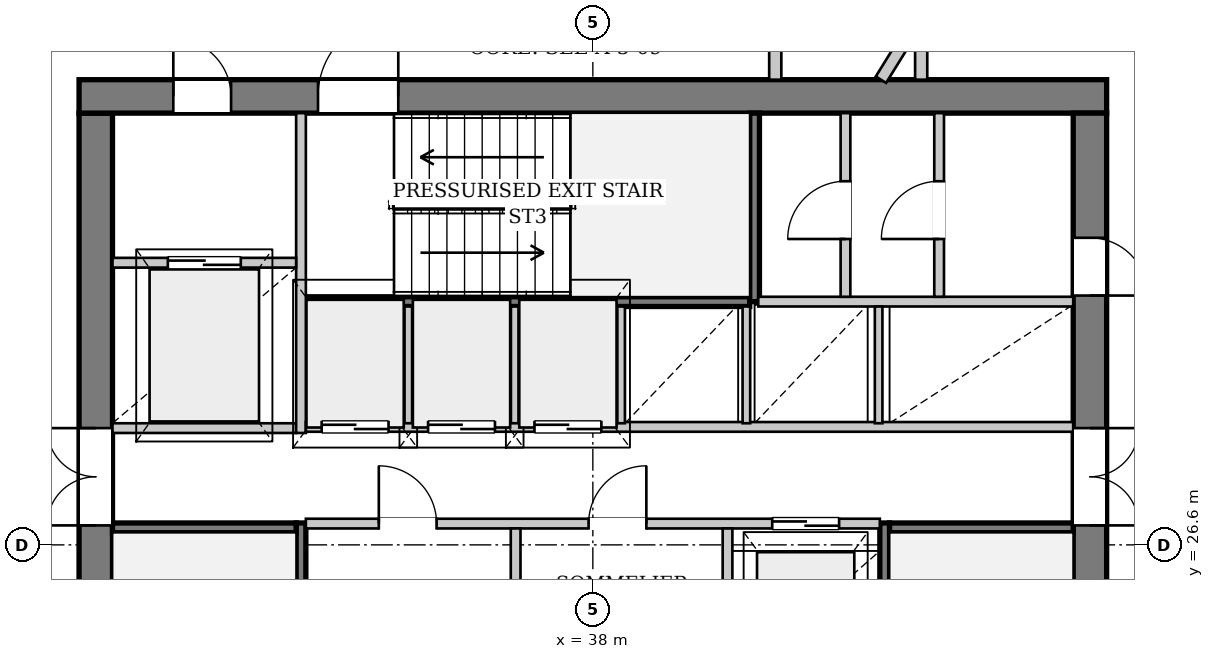
"""IFC4 building model, lengths in metres.
Left out: names, types, materials, properties, quantities, classifications, styles, units other than length and angle.
Written with IfcOpenShell. Run it as: python <this file> out.ifc"""

import sys

from ifc_helpers import new_model, si_unit, direction, frame, frame_2d, origin, place, context, subcontext, project, spatial, rectangle, extrude, source, transform, mapped, element, fill, save


model = new_model("IFC4")
c1 = context("Model", 3, precision=1e-05, world=origin(), true_north=direction((0.0, 1.0)))
c2 = subcontext(c1, "Body", "Model", "MODEL_VIEW")
j1 = project(units=[si_unit("LENGTHUNIT", "METRE"), si_unit("PLANEANGLEUNIT", "RADIAN")], contexts=[c1])
p1 = place(None, origin())
s1 = spatial("IfcSite", under=j1, at=p1, CompositionType="ELEMENT")
p2 = place(p1, origin())
s2 = spatial("IfcBuilding", under=s1, at=p2, CompositionType="ELEMENT")
p3 = place(p2, frame((0.0, 0.0, 178.55)))
s3 = spatial("IfcBuildingStorey", under=s2, at=p3, CompositionType="ELEMENT", Elevation=178.55)
p4 = place(p3, frame((29.825, 19.5, 0.0), z_axis=(0.0, 0.0, 1.0), x_axis=(0.0, 1.0, 0.0)))
e1 = element("IfcWall", 1, at=p4, inside=s3, PredefinedType="SHEAR", context=c2, shape_type="SweptSolid", body=[
    extrude(rectangle(XDim=14.2, YDim=0.55, at=frame_2d((7.1, 0.0))), origin(), (0.0, 0.0, 1.0), 3.33),
])
p5 = place(p4, frame((7.42, 0.0, 0.0)))
e2 = element("IfcOpeningElement", 2, at=p5, cuts=e1, PredefinedType="OPENING", context=c2, shape_type="SweptSolid", body=[
    extrude(rectangle(XDim=1.6, YDim=2.2, at=frame_2d((0.8, 1.1))), frame((0.0, 0.285, 0.0), z_axis=(0.0, -1.0, 0.0), x_axis=(1.0, 0.0, 0.0)), (0.0, 0.0, 1.0), 0.57),
])
p6 = place(p3, frame((29.55, 33.975, 0.0), z_axis=(0.0, 0.0, 1.0), x_axis=(1.0, 0.0, 0.0)))
e3 = element("IfcWall", 3, at=p6, inside=s3, PredefinedType="SHEAR", context=c2, shape_type="SweptSolid", body=[
    extrude(rectangle(XDim=16.9, YDim=0.55, at=frame_2d((8.45, 0.0))), origin(), (0.0, 0.0, 1.0), 3.33),
])
p7 = place(p6, frame((1.55, 0.0, 0.0)))
e4 = element("IfcOpeningElement", 4, at=p7, cuts=e3, PredefinedType="OPENING", context=c2, shape_type="SweptSolid", body=[
    extrude(rectangle(XDim=0.95, YDim=2.1, at=frame_2d((0.475, 1.05))), frame((0.0, 0.285, 0.0), z_axis=(0.0, -1.0, 0.0), x_axis=(1.0, 0.0, 0.0)), (0.0, 0.0, 1.0), 0.57),
])
p8 = place(p6, frame((3.93, 0.0, 0.0)))
e5 = element("IfcOpeningElement", 5, at=p8, cuts=e3, PredefinedType="OPENING", context=c2, shape_type="SweptSolid", body=[
    extrude(rectangle(XDim=1.32, YDim=2.2, at=frame_2d((0.66, 1.1))), frame((0.0, 0.285, 0.0), z_axis=(0.0, -1.0, 0.0), x_axis=(1.0, 0.0, 0.0)), (0.0, 0.0, 1.0), 0.57),
])
p9 = place(p3, frame((46.175, 33.7, 0.0), z_axis=(0.0, 0.0, 1.0), x_axis=(0.0, -1.0, 0.0)))
e6 = element("IfcWall", 6, at=p9, inside=s3, PredefinedType="SHEAR", context=c2, shape_type="SweptSolid", body=[
    extrude(rectangle(XDim=14.2, YDim=0.55, at=frame_2d((7.1, 0.0))), origin(), (0.0, 0.0, 1.0), 3.33),
])
p10 = place(p9, frame((5.18, 0.0, 0.0)))
e7 = element("IfcOpeningElement", 7, at=p10, cuts=e6, PredefinedType="OPENING", context=c2, shape_type="SweptSolid", body=[
    extrude(rectangle(XDim=1.6, YDim=2.2, at=frame_2d((0.8, 1.1))), frame((0.0, 0.285, 0.0), z_axis=(0.0, -1.0, 0.0), x_axis=(1.0, 0.0, 0.0)), (0.0, 0.0, 1.0), 0.57),
])
p11 = place(p9, frame((2.05, 0.0, 0.0)))
e8 = element("IfcOpeningElement", 8, at=p11, cuts=e6, PredefinedType="OPENING", context=c2, shape_type="SweptSolid", body=[
    extrude(rectangle(XDim=0.95, YDim=2.1, at=frame_2d((0.475, 1.05))), frame((0.0, 0.285, 0.0), z_axis=(0.0, -1.0, 0.0), x_axis=(1.0, 0.0, 0.0)), (0.0, 0.0, 1.0), 0.57),
])
p12 = place(p3, frame((33.2, 19.5, 0.0), z_axis=(0.0, 0.0, 1.0), x_axis=(0.0, 1.0, 0.0)))
e9 = element("IfcWall", 9, at=p12, inside=s3, PredefinedType="PARTITIONING", context=c2, shape_type="SweptSolid", body=[
    extrude(rectangle(XDim=7.46, YDim=0.16, at=frame_2d((3.73, 0.0))), origin(), (0.0, 0.0, 1.0), 3.33),
])
p13 = place(p12, frame((0.08, 0.0, 0.0)))
e10 = element("IfcOpeningElement", 10, at=p13, cuts=e9, PredefinedType="OPENING", context=c2, shape_type="SweptSolid", body=[
    extrude(rectangle(XDim=1.32, YDim=2.2, at=frame_2d((0.66, 1.1))), frame((0.0, 0.09, 0.0), z_axis=(0.0, -1.0, 0.0), x_axis=(1.0, 0.0, 0.0)), (0.0, 0.0, 1.0), 0.18),
])
p14 = place(p3, frame((30.1, 26.88, 0.0), z_axis=(0.0, 0.0, 1.0), x_axis=(1.0, 0.0, 0.0)))
e11 = element("IfcWall", 11, at=p14, inside=s3, PredefinedType="PARTITIONING", context=c2, shape_type="SweptSolid", body=[
    extrude(rectangle(XDim=3.02, YDim=0.16, at=frame_2d((1.51, 0.0))), origin(), (0.0, 0.0, 1.0), 3.33),
])
p15 = place(p3, frame((42.8, 26.96, 0.0), z_axis=(0.0, 0.0, 1.0), x_axis=(0.0, -1.0, 0.0)))
e12 = element("IfcWall", 12, at=p15, inside=s3, PredefinedType="PARTITIONING", context=c2, shape_type="SweptSolid", body=[
    extrude(rectangle(XDim=7.46, YDim=0.16, at=frame_2d((3.73, 0.0))), origin(), (0.0, 0.0, 1.0), 3.33),
])
p16 = place(p15, frame((6.06, 0.0, 0.0)))
e13 = element("IfcOpeningElement", 13, at=p16, cuts=e12, PredefinedType="OPENING", context=c2, shape_type="SweptSolid", body=[
    extrude(rectangle(XDim=1.32, YDim=2.2, at=frame_2d((0.66, 1.1))), frame((0.0, 0.09, 0.0), z_axis=(0.0, -1.0, 0.0), x_axis=(1.0, 0.0, 0.0)), (0.0, 0.0, 1.0), 0.18),
])
p17 = place(p3, frame((42.88, 26.88, 0.0), z_axis=(0.0, 0.0, 1.0), x_axis=(1.0, 0.0, 0.0)))
e14 = element("IfcWall", 14, at=p17, inside=s3, PredefinedType="PARTITIONING", context=c2, shape_type="SweptSolid", body=[
    extrude(rectangle(XDim=3.02, YDim=0.16, at=frame_2d((1.51, 0.0))), origin(), (0.0, 0.0, 1.0), 3.33),
])
p18 = place(p3, frame((33.28, 30.6, 0.0), z_axis=(0.0, 0.0, 1.0), x_axis=(1.0, 0.0, 0.0)))
e15 = element("IfcWall", 15, at=p18, inside=s3, PredefinedType="PARTITIONING", context=c2, shape_type="SweptSolid", body=[
    extrude(rectangle(XDim=7.3, YDim=0.16, at=frame_2d((3.65, 0.0))), origin(), (0.0, 0.0, 1.0), 3.33),
])
p19 = place(p3, frame((40.66, 30.6, 0.0), z_axis=(0.0, 0.0, 1.0), x_axis=(0.0, 1.0, 0.0)))
e16 = element("IfcWall", 16, at=p19, inside=s3, PredefinedType="PARTITIONING", context=c2, shape_type="SweptSolid", body=[
    extrude(rectangle(XDim=3.1, YDim=0.16, at=frame_2d((1.55, 0.0))), origin(), (0.0, 0.0, 1.0), 3.33),
])
p20 = place(p3, frame((30.1, 28.52, 0.0), z_axis=(0.0, 0.0, 1.0), x_axis=(1.0, 0.0, 0.0)))
e17 = element("IfcWall", 17, at=p20, inside=s3, PredefinedType="PARTITIONING", context=c2, shape_type="SweptSolid", body=[
    extrude(rectangle(XDim=3.02, YDim=0.16, at=frame_2d((1.51, 0.0))), origin(), (0.0, 0.0, 1.0), 3.33),
])
p21 = place(p3, frame((33.2, 28.44, 0.0), z_axis=(0.0, 0.0, 1.0), x_axis=(0.0, 1.0, 0.0)))
e18 = element("IfcWall", 18, at=p21, inside=s3, PredefinedType="PARTITIONING", context=c2, shape_type="SweptSolid", body=[
    extrude(rectangle(XDim=5.26, YDim=0.16, at=frame_2d((2.63, 0.0))), origin(), (0.0, 0.0, 1.0), 3.33),
])
p22 = place(p3, frame((30.1, 31.24, 0.0), z_axis=(0.0, 0.0, 1.0), x_axis=(1.0, 0.0, 0.0)))
e19 = element("IfcWall", 19, at=p22, inside=s3, PredefinedType="PARTITIONING", context=c2, shape_type="SweptSolid", body=[
    extrude(rectangle(XDim=3.02, YDim=0.16, at=frame_2d((1.51, 0.0))), origin(), (0.0, 0.0, 1.0), 3.33),
])
p23 = place(p22, frame((0.91, 0.0, 0.0)))
e20 = element("IfcOpeningElement", 20, at=p23, cuts=e19, PredefinedType="OPENING", context=c2, shape_type="SweptSolid", body=[
    extrude(rectangle(XDim=1.2, YDim=2.2, at=frame_2d((0.6, 1.1))), frame((0.0, 0.09, 0.0), z_axis=(0.0, -1.0, 0.0), x_axis=(1.0, 0.0, 0.0)), (0.0, 0.0, 1.0), 0.18),
])
p24 = place(p3, frame((33.28, 26.95, 0.0), z_axis=(0.0, 0.0, 1.0), x_axis=(1.0, 0.0, 0.0)))
e21 = element("IfcWall", 21, at=p24, inside=s3, PredefinedType="PARTITIONING", context=c2, shape_type="SweptSolid", body=[
    extrude(rectangle(XDim=9.44, YDim=0.16, at=frame_2d((4.72, 0.0))), origin(), (0.0, 0.0, 1.0), 3.33),
])
p25 = place(p24, frame((1.2, 0.0, 0.0)))
e22 = element("IfcOpeningElement", 22, at=p25, cuts=e21, PredefinedType="OPENING", context=c2, shape_type="SweptSolid", body=[
    extrude(rectangle(XDim=0.95, YDim=2.1, at=frame_2d((0.475, 1.05))), frame((0.0, 0.09, 0.0), z_axis=(0.0, -1.0, 0.0), x_axis=(1.0, 0.0, 0.0)), (0.0, 0.0, 1.0), 0.18),
])
p26 = place(p24, frame((4.65, 0.0, 0.0)))
e23 = element("IfcOpeningElement", 23, at=p26, cuts=e21, PredefinedType="OPENING", context=c2, shape_type="SweptSolid", body=[
    extrude(rectangle(XDim=0.95, YDim=2.1, at=frame_2d((0.475, 1.05))), frame((0.0, 0.09, 0.0), z_axis=(0.0, -1.0, 0.0), x_axis=(1.0, 0.0, 0.0)), (0.0, 0.0, 1.0), 0.18),
])
p27 = place(p24, frame((7.67, 0.0, 0.0)))
e24 = element("IfcOpeningElement", 24, at=p27, cuts=e21, PredefinedType="OPENING", context=c2, shape_type="SweptSolid", body=[
    extrude(rectangle(XDim=1.1, YDim=2.2, at=frame_2d((0.55, 1.1))), frame((0.0, 0.09, 0.0), z_axis=(0.0, -1.0, 0.0), x_axis=(1.0, 0.0, 0.0)), (0.0, 0.0, 1.0), 0.18),
])
for number, where, z_axis, x_axis in (
    (25, (36.73, 24.56, 0.0), (0.0, 0.0, 1.0), (0.0, 1.0, 0.0)),
    (26, (40.215, 24.56, 0.0), (0.0, 0.0, 1.0), (0.0, 1.0, 0.0)),
):
    element("IfcWall", number, at=place(p3, frame(where, z_axis=z_axis, x_axis=x_axis)), inside=s3, PredefinedType="PARTITIONING", context=c2, shape_type="SweptSolid", body=[
        extrude(rectangle(XDim=2.31, YDim=0.16, at=frame_2d((1.155, 0.0))), origin(), (0.0, 0.0, 1.0), 3.33),
    ])
p28 = place(p3, frame((33.28, 28.54, 0.0), z_axis=(0.0, 0.0, 1.0), x_axis=(1.0, 0.0, 0.0)))
e27 = element("IfcWall", 27, at=p28, inside=s3, PredefinedType="PARTITIONING", context=c2, shape_type="SweptSolid", body=[
    extrude(rectangle(XDim=12.62, YDim=0.16, at=frame_2d((6.31, 0.0))), origin(), (0.0, 0.0, 1.0), 3.33),
])
p29 = place(p28, frame((0.26, 0.0, 0.0)))
e28 = element("IfcOpeningElement", 28, at=p29, cuts=e27, PredefinedType="OPENING", context=c2, shape_type="SweptSolid", body=[
    extrude(rectangle(XDim=1.1, YDim=2.2, at=frame_2d((0.55, 1.1))), frame((0.0, 0.09, 0.0), z_axis=(0.0, -1.0, 0.0), x_axis=(1.0, 0.0, 0.0)), (0.0, 0.0, 1.0), 0.18),
])
p30 = place(p28, frame((2.01, 0.0, 0.0)))
e29 = element("IfcOpeningElement", 29, at=p30, cuts=e27, PredefinedType="OPENING", context=c2, shape_type="SweptSolid", body=[
    extrude(rectangle(XDim=1.1, YDim=2.2, at=frame_2d((0.55, 1.1))), frame((0.0, 0.09, 0.0), z_axis=(0.0, -1.0, 0.0), x_axis=(1.0, 0.0, 0.0)), (0.0, 0.0, 1.0), 0.18),
])
p31 = place(p28, frame((3.76, 0.0, 0.0)))
e30 = element("IfcOpeningElement", 30, at=p31, cuts=e27, PredefinedType="OPENING", context=c2, shape_type="SweptSolid", body=[
    extrude(rectangle(XDim=1.1, YDim=2.2, at=frame_2d((0.55, 1.1))), frame((0.0, 0.09, 0.0), z_axis=(0.0, -1.0, 0.0), x_axis=(1.0, 0.0, 0.0)), (0.0, 0.0, 1.0), 0.18),
])
p32 = place(p3, frame((40.72, 30.6, 0.0), z_axis=(0.0, 0.0, 1.0), x_axis=(1.0, 0.0, 0.0)))
e31 = element("IfcWall", 31, at=p32, inside=s3, PredefinedType="PARTITIONING", context=c2, shape_type="SweptSolid", body=[
    extrude(rectangle(XDim=5.18, YDim=0.16, at=frame_2d((2.59, 0.0))), origin(), (0.0, 0.0, 1.0), 3.33),
])
for number, where, z_axis, x_axis in (
    (32, (34.965, 28.6, 0.0), (0.0, 0.0, 1.0), (0.0, 1.0, 0.0)),
    (33, (36.715, 28.6, 0.0), (0.0, 0.0, 1.0), (0.0, 1.0, 0.0)),
    (34, (38.465, 28.6, 0.0), (0.0, 0.0, 1.0), (0.0, 1.0, 0.0)),
    (35, (40.525, 28.6, 0.0), (0.0, 0.0, 1.0), (0.0, 1.0, 0.0)),
    (36, (42.7, 28.6, 0.0), (0.0, 0.0, 1.0), (0.0, 1.0, 0.0)),
):
    element("IfcWall", number, at=place(p3, frame(where, z_axis=z_axis, x_axis=x_axis)), inside=s3, PredefinedType="PARTITIONING", context=c2, shape_type="SweptSolid", body=[
        extrude(rectangle(XDim=1.92, YDim=0.125, at=frame_2d((0.96, 0.0))), origin(), (0.0, 0.0, 1.0), 3.33),
    ])
p33 = place(p3, frame((42.155, 30.68, 0.0), z_axis=(0.0, 0.0, 1.0), x_axis=(0.0, 1.0, 0.0)))
e37 = element("IfcWall", 37, at=p33, inside=s3, PredefinedType="PARTITIONING", context=c2, shape_type="SweptSolid", body=[
    extrude(rectangle(XDim=3.02, YDim=0.16, at=frame_2d((1.51, 0.0))), origin(), (0.0, 0.0, 1.0), 3.33),
])
p34 = place(p33, frame((0.95, 0.0, 0.0)))
e38 = element("IfcOpeningElement", 38, at=p34, cuts=e37, PredefinedType="OPENING", context=c2, shape_type="SweptSolid", body=[
    extrude(rectangle(XDim=0.95, YDim=2.1, at=frame_2d((0.475, 1.05))), frame((0.0, 0.09, 0.0), z_axis=(0.0, -1.0, 0.0), x_axis=(1.0, 0.0, 0.0)), (0.0, 0.0, 1.0), 0.18),
])
p35 = place(p3, frame((43.695, 30.68, 0.0), z_axis=(0.0, 0.0, 1.0), x_axis=(0.0, 1.0, 0.0)))
e39 = element("IfcWall", 39, at=p35, inside=s3, PredefinedType="PARTITIONING", context=c2, shape_type="SweptSolid", body=[
    extrude(rectangle(XDim=3.02, YDim=0.16, at=frame_2d((1.51, 0.0))), origin(), (0.0, 0.0, 1.0), 3.33),
])
p36 = place(p35, frame((0.95, 0.0, 0.0)))
e40 = element("IfcOpeningElement", 40, at=p36, cuts=e39, PredefinedType="OPENING", context=c2, shape_type="SweptSolid", body=[
    extrude(rectangle(XDim=0.95, YDim=2.1, at=frame_2d((0.475, 1.05))), frame((0.0, 0.09, 0.0), z_axis=(0.0, -1.0, 0.0), x_axis=(1.0, 0.0, 0.0)), (0.0, 0.0, 1.0), 0.18),
])
p37 = place(p3, frame((42.738, 34.25, 0.0), z_axis=(0.0, 0.0, 1.0), x_axis=(0.526414798645, 0.850227886962, 0.0)))
e41 = element("IfcWall", 41, at=p37, inside=s3, PredefinedType="PARTITIONING", context=c2, shape_type="SweptSolid", body=[
    extrude(rectangle(XDim=1.257, YDim=0.2, at=frame_2d((0.628, 0.0))), origin(), (0.0, 0.0, 1.0), 3.33),
])
for number, where, z_axis, x_axis in (
    (42, (41.0, 34.25, 0.0), (0.0, 0.0, 1.0), (0.0, 1.0, 0.0)),
    (43, (43.4, 34.25, 0.0), (0.0, 0.0, 1.0), (0.0, 1.0, 0.0)),
):
    element("IfcWall", number, at=place(p3, frame(where, z_axis=z_axis, x_axis=x_axis)), inside=s3, PredefinedType="PARTITIONING", context=c2, shape_type="SweptSolid", body=[
        extrude(rectangle(XDim=1.95, YDim=0.2, at=frame_2d((0.975, 0.0))), origin(), (0.0, 0.0, 1.0), 3.33),
    ])
m1 = source(origin(), c2, "Body", "SweptSolid", [
    extrude(rectangle(XDim=1.6, YDim=2.2, at=frame_2d((0.8, 1.1))), frame((0.0, 0.025, 0.0), z_axis=(0.0, -1.0, 0.0), x_axis=(1.0, 0.0, 0.0)), (0.0, 0.0, 1.0), 0.05),
])
p38 = place(p5, origin())
e44 = element("IfcDoor", 44, at=p38, inside=s3, OperationType="DOUBLE_DOOR_SINGLE_SWING", PredefinedType="DOOR", context=c2, shape_type="MappedRepresentation", body=[
    mapped(m1, transform((0.0, 0.0, 0.0), x_axis=(1.0, 0.0, 0.0), y_axis=(0.0, 1.0, 0.0), z_axis=(0.0, 0.0, 1.0), scale=1.0)),
])
fill(e2, e44)
m2 = source(origin(), c2, "Body", "SweptSolid", [
    extrude(rectangle(XDim=0.95, YDim=2.1, at=frame_2d((0.475, 1.05))), frame((0.0, 0.025, 0.0), z_axis=(0.0, -1.0, 0.0), x_axis=(1.0, 0.0, 0.0)), (0.0, 0.0, 1.0), 0.05),
])
p39 = place(p7, origin())
e45 = element("IfcDoor", 45, at=p39, inside=s3, OperationType="SINGLE_SWING_LEFT", PredefinedType="DOOR", context=c2, shape_type="MappedRepresentation", body=[
    mapped(m2, transform((0.0, 0.0, 0.0), x_axis=(1.0, 0.0, 0.0), y_axis=(0.0, 1.0, 0.0), z_axis=(0.0, 0.0, 1.0), scale=1.0)),
])
fill(e4, e45)
m3 = source(origin(), c2, "Body", "SweptSolid", [
    extrude(rectangle(XDim=1.32, YDim=2.2, at=frame_2d((0.66, 1.1))), frame((0.0, 0.025, 0.0), z_axis=(0.0, -1.0, 0.0), x_axis=(1.0, 0.0, 0.0)), (0.0, 0.0, 1.0), 0.05),
])
p40 = place(p8, origin())
e46 = element("IfcDoor", 46, at=p40, inside=s3, OperationType="SINGLE_SWING_RIGHT", PredefinedType="DOOR", context=c2, shape_type="MappedRepresentation", body=[
    mapped(m3, transform((0.0, 0.0, 0.0), x_axis=(1.0, 0.0, 0.0), y_axis=(0.0, 1.0, 0.0), z_axis=(0.0, 0.0, 1.0), scale=1.0)),
])
fill(e5, e46)
p41 = place(p10, origin())
e47 = element("IfcDoor", 47, at=p41, inside=s3, OperationType="DOUBLE_DOOR_SINGLE_SWING", PredefinedType="DOOR", context=c2, shape_type="MappedRepresentation", body=[
    mapped(m1, transform((0.0, 0.0, 0.0), x_axis=(1.0, 0.0, 0.0), y_axis=(0.0, 1.0, 0.0), z_axis=(0.0, 0.0, 1.0), scale=1.0)),
])
fill(e7, e47)
m4 = source(origin(), c2, "Body", "SweptSolid", [
    extrude(rectangle(XDim=1.2, YDim=2.2, at=frame_2d((0.6, 1.1))), frame((0.0, 0.025, 0.0), z_axis=(0.0, -1.0, 0.0), x_axis=(1.0, 0.0, 0.0)), (0.0, 0.0, 1.0), 0.05),
])
p42 = place(p23, origin())
e48 = element("IfcDoor", 48, at=p42, inside=s3, OperationType="DOUBLE_DOOR_SLIDING", PredefinedType="DOOR", context=c2, shape_type="MappedRepresentation", body=[
    mapped(m4, transform((0.0, 0.0, 0.0), x_axis=(1.0, 0.0, 0.0), y_axis=(0.0, 1.0, 0.0), z_axis=(0.0, 0.0, 1.0), scale=1.0)),
])
fill(e20, e48)
p43 = place(p25, origin())
e49 = element("IfcDoor", 49, at=p43, inside=s3, OperationType="SINGLE_SWING_LEFT", PredefinedType="DOOR", context=c2, shape_type="MappedRepresentation", body=[
    mapped(m2, transform((0.0, 0.0, 0.0), x_axis=(1.0, 0.0, 0.0), y_axis=(0.0, 1.0, 0.0), z_axis=(0.0, 0.0, 1.0), scale=1.0)),
])
fill(e22, e49)
p44 = place(p26, origin())
e50 = element("IfcDoor", 50, at=p44, inside=s3, OperationType="SINGLE_SWING_RIGHT", PredefinedType="DOOR", context=c2, shape_type="MappedRepresentation", body=[
    mapped(m2, transform((0.0, 0.0, 0.0), x_axis=(1.0, 0.0, 0.0), y_axis=(0.0, 1.0, 0.0), z_axis=(0.0, 0.0, 1.0), scale=1.0)),
])
fill(e23, e50)
m5 = source(origin(), c2, "Body", "SweptSolid", [
    extrude(rectangle(XDim=1.1, YDim=2.2, at=frame_2d((0.55, 1.1))), frame((0.0, 0.025, 0.0), z_axis=(0.0, -1.0, 0.0), x_axis=(1.0, 0.0, 0.0)), (0.0, 0.0, 1.0), 0.05),
])
p45 = place(p27, origin())
e51 = element("IfcDoor", 51, at=p45, inside=s3, OperationType="DOUBLE_DOOR_SLIDING", PredefinedType="DOOR", context=c2, shape_type="MappedRepresentation", body=[
    mapped(m5, transform((0.0, 0.0, 0.0), x_axis=(1.0, 0.0, 0.0), y_axis=(0.0, 1.0, 0.0), z_axis=(0.0, 0.0, 1.0), scale=1.0)),
])
fill(e24, e51)
p46 = place(p29, origin())
e52 = element("IfcDoor", 52, at=p46, inside=s3, OperationType="DOUBLE_DOOR_SLIDING", PredefinedType="DOOR", context=c2, shape_type="MappedRepresentation", body=[
    mapped(m5, transform((0.0, 0.0, 0.0), x_axis=(1.0, 0.0, 0.0), y_axis=(0.0, 1.0, 0.0), z_axis=(0.0, 0.0, 1.0), scale=1.0)),
])
fill(e28, e52)
p47 = place(p30, origin())
e53 = element("IfcDoor", 53, at=p47, inside=s3, OperationType="DOUBLE_DOOR_SLIDING", PredefinedType="DOOR", context=c2, shape_type="MappedRepresentation", body=[
    mapped(m5, transform((0.0, 0.0, 0.0), x_axis=(1.0, 0.0, 0.0), y_axis=(0.0, 1.0, 0.0), z_axis=(0.0, 0.0, 1.0), scale=1.0)),
])
fill(e29, e53)
p48 = place(p31, origin())
e54 = element("IfcDoor", 54, at=p48, inside=s3, OperationType="DOUBLE_DOOR_SLIDING", PredefinedType="DOOR", context=c2, shape_type="MappedRepresentation", body=[
    mapped(m5, transform((0.0, 0.0, 0.0), x_axis=(1.0, 0.0, 0.0), y_axis=(0.0, 1.0, 0.0), z_axis=(0.0, 0.0, 1.0), scale=1.0)),
])
fill(e30, e54)
p49 = place(p34, origin())
e55 = element("IfcDoor", 55, at=p49, inside=s3, OperationType="SINGLE_SWING_LEFT", PredefinedType="DOOR", context=c2, shape_type="MappedRepresentation", body=[
    mapped(m2, transform((0.0, 0.0, 0.0), x_axis=(1.0, 0.0, 0.0), y_axis=(0.0, 1.0, 0.0), z_axis=(0.0, 0.0, 1.0), scale=1.0)),
])
fill(e38, e55)
p50 = place(p36, origin())
e56 = element("IfcDoor", 56, at=p50, inside=s3, OperationType="SINGLE_SWING_LEFT", PredefinedType="DOOR", context=c2, shape_type="MappedRepresentation", body=[
    mapped(m2, transform((0.0, 0.0, 0.0), x_axis=(1.0, 0.0, 0.0), y_axis=(0.0, 1.0, 0.0), z_axis=(0.0, 0.0, 1.0), scale=1.0)),
])
fill(e40, e56)
p51 = place(p11, origin())
e57 = element("IfcDoor", 57, at=p51, inside=s3, OperationType="SINGLE_SWING_RIGHT", PredefinedType="DOOR", context=c2, shape_type="MappedRepresentation", body=[
    mapped(m2, transform((0.0, 0.0, 0.0), x_axis=(1.0, 0.0, 0.0), y_axis=(0.0, 1.0, 0.0), z_axis=(0.0, 0.0, 1.0), scale=1.0)),
])
fill(e8, e57)
save(model, sys.argv[1])
